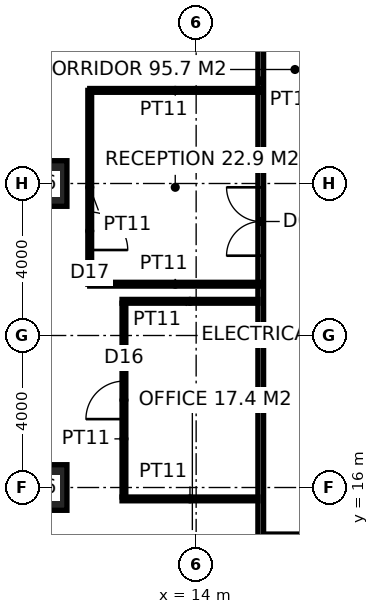
"""IFC4 building model, lengths in metres.
Left out: names, types, materials, properties, quantities, classifications, styles, units other than length and angle.
Written with IfcOpenShell. Run it as: python <this file> out.ifc"""

import sys

from ifc_helpers import new_model, si_unit, direction, frame, frame_2d, origin, origin_2d, place, context, subcontext, project, spatial, rectangle, hollow_rectangle, extrude, element, fill, save


model = new_model("IFC4")
c1 = context("Model", 3, precision=1e-05, world=origin(), true_north=direction((0.0, 1.0)))
c2 = subcontext(c1, "Body", "Model", "MODEL_VIEW")
j1 = project(units=[si_unit("LENGTHUNIT", "METRE"), si_unit("PLANEANGLEUNIT", "RADIAN")], contexts=[c1])
p1 = place(None, origin())
s1 = spatial("IfcSite", under=j1, at=p1, CompositionType="ELEMENT")
p2 = place(p1, origin())
s2 = spatial("IfcBuilding", under=s1, at=p2, CompositionType="ELEMENT")
p3 = place(p2, frame((0.0, 0.0, 67.0)))
s3 = spatial("IfcBuildingStorey", under=s2, at=p3, CompositionType="ELEMENT", Elevation=67.0)
for number, where, z_axis, x_axis in (
    (1, (10.0, 16.0, 0.0), (0.0, 0.0, 1.0), (1.0, 0.0, 0.0)),
    (2, (10.0, 24.0, 0.0), (0.0, 0.0, 1.0), (1.0, 0.0, 0.0)),
):
    element("IfcColumn", number, at=place(p3, frame(where, z_axis=z_axis, x_axis=x_axis)), inside=s3, PredefinedType="COLUMN", context=c2, shape_type="SweptSolid", body=[
        extrude(hollow_rectangle(XDim=1.2, YDim=1.2, WallThickness=0.125, at=origin_2d()), origin(), (0.0, 0.0, 1.0), 4.0),
    ])
p4 = place(p3, frame((15.7, 14.625, 0.0), z_axis=(0.0, 0.0, 1.0), x_axis=(0.0, 1.0, 0.0)))
e3 = element("IfcWall", 3, at=p4, inside=s3, PredefinedType="PARTITIONING", context=c2, shape_type="SweptSolid", body=[
    extrude(rectangle(XDim=24.15, YDim=0.15, at=frame_2d((12.075, 0.0))), origin(), (0.0, 0.0, 1.0), 3.85),
])
p5 = place(p4, frame((7.475, 0.0, 0.0)))
e4 = element("IfcOpeningElement", 4, at=p5, cuts=e3, PredefinedType="OPENING", context=c2, shape_type="SweptSolid", body=[
    extrude(rectangle(XDim=1.8, YDim=2.4, at=frame_2d((0.9, 1.2))), frame((0.0, 0.085, 0.0), z_axis=(0.0, -1.0, 0.0), x_axis=(1.0, 0.0, 0.0)), (0.0, 0.0, 1.0), 0.17),
])
p6 = place(p4, frame((19.425, 0.0, 0.0)))
e5 = element("IfcOpeningElement", 5, at=p6, cuts=e3, PredefinedType="OPENING", context=c2, shape_type="SweptSolid", body=[
    extrude(rectangle(XDim=1.8, YDim=2.4, at=frame_2d((0.9, 1.2))), frame((0.0, 0.085, 0.0), z_axis=(0.0, -1.0, 0.0), x_axis=(1.0, 0.0, 0.0)), (0.0, 0.0, 1.0), 0.17),
])
for number, where, z_axis, x_axis in (
    (6, (12.05, 15.7, 0.0), (0.0, 0.0, 1.0), (1.0, 0.0, 0.0)),
    (7, (12.05, 20.9, 0.0), (0.0, 0.0, 1.0), (1.0, 0.0, 0.0)),
):
    element("IfcWall", number, at=place(p3, frame(where, z_axis=z_axis, x_axis=x_axis)), inside=s3, PredefinedType="PARTITIONING", context=c2, shape_type="SweptSolid", body=[
        extrude(rectangle(XDim=3.575, YDim=0.1, at=frame_2d((1.788, 0.0))), origin(), (0.0, 0.0, 1.0), 3.85),
    ])
p7 = place(p3, frame((12.1, 15.75, 0.0), z_axis=(0.0, 0.0, 1.0), x_axis=(0.0, 1.0, 0.0)))
e8 = element("IfcWall", 8, at=p7, inside=s3, PredefinedType="PARTITIONING", context=c2, shape_type="SweptSolid", body=[
    extrude(rectangle(XDim=5.1, YDim=0.1, at=frame_2d((2.55, 0.0))), origin(), (0.0, 0.0, 1.0), 3.85),
])
p8 = place(p7, frame((2.05, 0.0, 0.0)))
e9 = element("IfcOpeningElement", 9, at=p8, cuts=e8, PredefinedType="OPENING", context=c2, shape_type="SweptSolid", body=[
    extrude(rectangle(XDim=1.0, YDim=2.2, at=frame_2d((0.5, 1.1))), frame((0.0, 0.06, 0.0), z_axis=(0.0, -1.0, 0.0), x_axis=(1.0, 0.0, 0.0)), (0.0, 0.0, 1.0), 0.12),
])
p9 = place(p3, frame((15.7, 26.45, 0.0), z_axis=(0.0, 0.0, 1.0), x_axis=(-1.0, 0.0, 0.0)))
e10 = element("IfcWall", 10, at=p9, inside=s3, PredefinedType="PARTITIONING", context=c2, shape_type="SweptSolid", body=[
    extrude(rectangle(XDim=4.5, YDim=0.1, at=frame_2d((2.25, 0.0))), origin(), (0.0, 0.0, 1.0), 3.85),
])
p10 = place(p3, frame((11.2, 26.45, 0.0), z_axis=(0.0, 0.0, 1.0), x_axis=(0.0, -1.0, 0.0)))
e11 = element("IfcWall", 11, at=p10, inside=s3, PredefinedType="PARTITIONING", context=c2, shape_type="SweptSolid", body=[
    extrude(rectangle(XDim=5.1, YDim=0.1, at=frame_2d((2.55, 0.0))), origin(), (0.0, 0.0, 1.0), 3.85),
])
p11 = place(p10, frame((3.2, 0.0, 0.0)))
e12 = element("IfcOpeningElement", 12, at=p11, cuts=e11, PredefinedType="OPENING", context=c2, shape_type="SweptSolid", body=[
    extrude(rectangle(XDim=1.0, YDim=2.2, at=frame_2d((0.5, 1.1))), frame((0.0, 0.06, 0.0), z_axis=(0.0, -1.0, 0.0), x_axis=(1.0, 0.0, 0.0)), (0.0, 0.0, 1.0), 0.12),
])
p12 = place(p3, frame((11.2, 21.35, 0.0), z_axis=(0.0, 0.0, 1.0), x_axis=(1.0, 0.0, 0.0)))
e13 = element("IfcWall", 13, at=p12, inside=s3, PredefinedType="PARTITIONING", context=c2, shape_type="SweptSolid", body=[
    extrude(rectangle(XDim=4.5, YDim=0.1, at=frame_2d((2.25, 0.0))), origin(), (0.0, 0.0, 1.0), 3.85),
])
p13 = place(p5, origin())
e14 = element("IfcDoor", 14, at=p13, inside=s3, OperationType="DOUBLE_DOOR_DOUBLE_SWING", PredefinedType="DOOR", context=c2, shape_type="SweptSolid", body=[
    extrude(rectangle(XDim=1.8, YDim=2.4, at=frame_2d((0.9, 1.2))), frame((0.0, 0.025, 0.0), z_axis=(0.0, -1.0, 0.0), x_axis=(1.0, 0.0, 0.0)), (0.0, 0.0, 1.0), 0.05),
])
fill(e4, e14)
p14 = place(p8, origin())
e15 = element("IfcDoor", 15, at=p14, inside=s3, OperationType="SINGLE_SWING_LEFT", PredefinedType="DOOR", context=c2, shape_type="SweptSolid", body=[
    extrude(rectangle(XDim=1.0, YDim=2.2, at=frame_2d((0.5, 1.1))), frame((0.0, 0.025, 0.0), z_axis=(0.0, -1.0, 0.0), x_axis=(1.0, 0.0, 0.0)), (0.0, 0.0, 1.0), 0.05),
])
fill(e9, e15)
p15 = place(p11, origin())
e16 = element("IfcDoor", 16, at=p15, inside=s3, OperationType="SINGLE_SWING_RIGHT", PredefinedType="DOOR", context=c2, shape_type="SweptSolid", body=[
    extrude(rectangle(XDim=1.0, YDim=2.2, at=frame_2d((0.5, 1.1))), frame((0.0, 0.025, 0.0), z_axis=(0.0, -1.0, 0.0), x_axis=(1.0, 0.0, 0.0)), (0.0, 0.0, 1.0), 0.05),
])
fill(e12, e16)
save(model, sys.argv[1])
